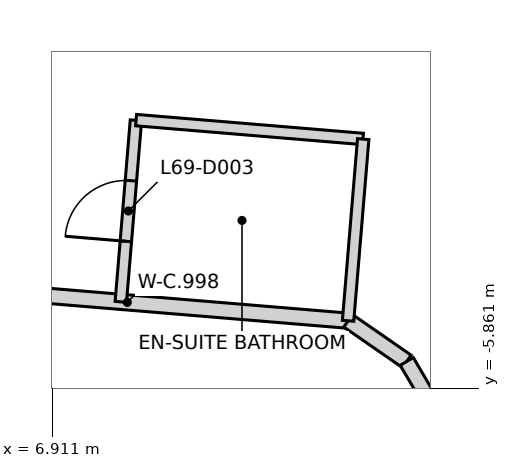
"""IFC4 building model, lengths in metres.
Left out: names, types, materials, properties, quantities, classifications, styles, units other than length and angle.
Written with IfcOpenShell. Run it as: python <this file> out.ifc"""

import sys

from ifc_helpers import new_model, si_unit, direction, frame, frame_2d, origin, place, context, subcontext, project, spatial, rectangle, extrude, element, fill, save


model = new_model("IFC4")
c1 = context("Model", 3, precision=1e-05, world=origin(), true_north=direction((0.0, 1.0)))
c2 = subcontext(c1, "Body", "Model", "MODEL_VIEW")
j1 = project(units=[si_unit("LENGTHUNIT", "METRE"), si_unit("PLANEANGLEUNIT", "RADIAN")], contexts=[c1])
p1 = place(None, origin())
s1 = spatial("IfcSite", under=j1, at=p1, CompositionType="ELEMENT")
p2 = place(p1, origin())
s2 = spatial("IfcBuilding", under=s1, at=p2, CompositionType="ELEMENT")
p3 = place(p2, frame((0.0, 0.0, 273.0)))
s3 = spatial("IfcBuildingStorey", under=s2, at=p3, CompositionType="ELEMENT", Elevation=273.0)
p4 = place(p3, frame((4.988, -4.487, 0.0), z_axis=(0.0, 0.0, 1.0), x_axis=(0.996576293439, -0.08267823992, 0.0)))
e1 = element("IfcWall", 1, at=p4, inside=s3, PredefinedType="PARTITIONING", context=c2, shape_type="SweptSolid", body=[
    extrude(rectangle(XDim=5.832, YDim=0.2, at=frame_2d((2.916, 0.0))), origin(), (0.0, 0.0, 1.0), 3.25),
])
p5 = place(p4, frame((0.2, 0.0, 0.0)))
e2 = element("IfcOpeningElement", 2, at=p5, cuts=e1, PredefinedType="OPENING", context=c2, shape_type="SweptSolid", body=[
    extrude(rectangle(XDim=0.95, YDim=2.1, at=frame_2d((0.475, 1.05))), frame((0.0, 0.11, 0.0), z_axis=(0.0, -1.0, 0.0), x_axis=(1.0, 0.0, 0.0)), (0.0, 0.0, 1.0), 0.22),
])
p6 = place(p3, frame((10.8, -4.97, 0.0), z_axis=(0.0, 0.0, 1.0), x_axis=(0.822107837165, -0.569331804902, 0.0)))
e3 = element("IfcWall", 3, at=p6, inside=s3, PredefinedType="PARTITIONING", context=c2, shape_type="SweptSolid", body=[
    extrude(rectangle(XDim=0.938, YDim=0.2, at=frame_2d((0.469, 0.0))), origin(), (0.0, 0.0, 1.0), 3.25),
])
p7 = place(p3, frame((11.571, -5.505, 0.0), z_axis=(0.0, 0.0, 1.0), x_axis=(0.507321116571, -0.86175709146, 0.0)))
e4 = element("IfcWall", 4, at=p7, inside=s3, PredefinedType="PARTITIONING", context=c2, shape_type="SweptSolid", body=[
    extrude(rectangle(XDim=1.63, YDim=0.2, at=frame_2d((0.815, 0.0))), origin(), (0.0, 0.0, 1.0), 3.25),
])
p8 = place(p3, frame((7.809, -4.721, 0.0), z_axis=(0.0, 0.0, 1.0), x_axis=(0.08303704791, 0.996546460871, 0.0)))
e5 = element("IfcWall", 5, at=p8, inside=s3, PredefinedType="PARTITIONING", context=c2, shape_type="SweptSolid", body=[
    extrude(rectangle(XDim=2.396, YDim=0.15, at=frame_2d((1.198, 0.0))), origin(), (0.0, 0.0, 1.0), 3.25),
])
p9 = place(p8, frame((0.8, 0.0, 0.0)))
e6 = element("IfcOpeningElement", 6, at=p9, cuts=e5, PredefinedType="OPENING", context=c2, shape_type="SweptSolid", body=[
    extrude(rectangle(XDim=0.8, YDim=2.1, at=frame_2d((0.4, 1.05))), frame((0.0, 0.085, 0.0), z_axis=(0.0, -1.0, 0.0), x_axis=(1.0, 0.0, 0.0)), (0.0, 0.0, 1.0), 0.17),
])
p10 = place(p3, frame((8.01, -2.33, 0.0), z_axis=(0.0, 0.0, 1.0), x_axis=(0.996572126957, -0.082728445969, 0.0)))
e7 = element("IfcWall", 7, at=p10, inside=s3, PredefinedType="PARTITIONING", context=c2, shape_type="SweptSolid", body=[
    extrude(rectangle(XDim=2.995, YDim=0.15, at=frame_2d((1.498, 0.0))), origin(), (0.0, 0.0, 1.0), 3.25),
])
p11 = place(p3, frame((10.799, -4.97, 0.0), z_axis=(0.0, 0.0, 1.0), x_axis=(0.08296965374, 0.996552074183, 0.0)))
e8 = element("IfcWall", 8, at=p11, inside=s3, PredefinedType="PARTITIONING", context=c2, shape_type="SweptSolid", body=[
    extrude(rectangle(XDim=2.398, YDim=0.15, at=frame_2d((1.199, 0.0))), origin(), (0.0, 0.0, 1.0), 3.25),
])
p12 = place(p9, frame((0.8, 0.0, 0.0), z_axis=(0.0, 0.0, 1.0), x_axis=(-1.0, 0.0, 0.0)))
e9 = element("IfcDoor", 9, at=p12, inside=s3, OperationType="SINGLE_SWING_LEFT", PredefinedType="DOOR", context=c2, shape_type="SweptSolid", body=[
    extrude(rectangle(XDim=0.8, YDim=2.1, at=frame_2d((0.4, 1.05))), frame((0.0, 0.025, 0.0), z_axis=(0.0, -1.0, 0.0), x_axis=(1.0, 0.0, 0.0)), (0.0, 0.0, 1.0), 0.05),
])
fill(e6, e9)
save(model, sys.argv[1])
